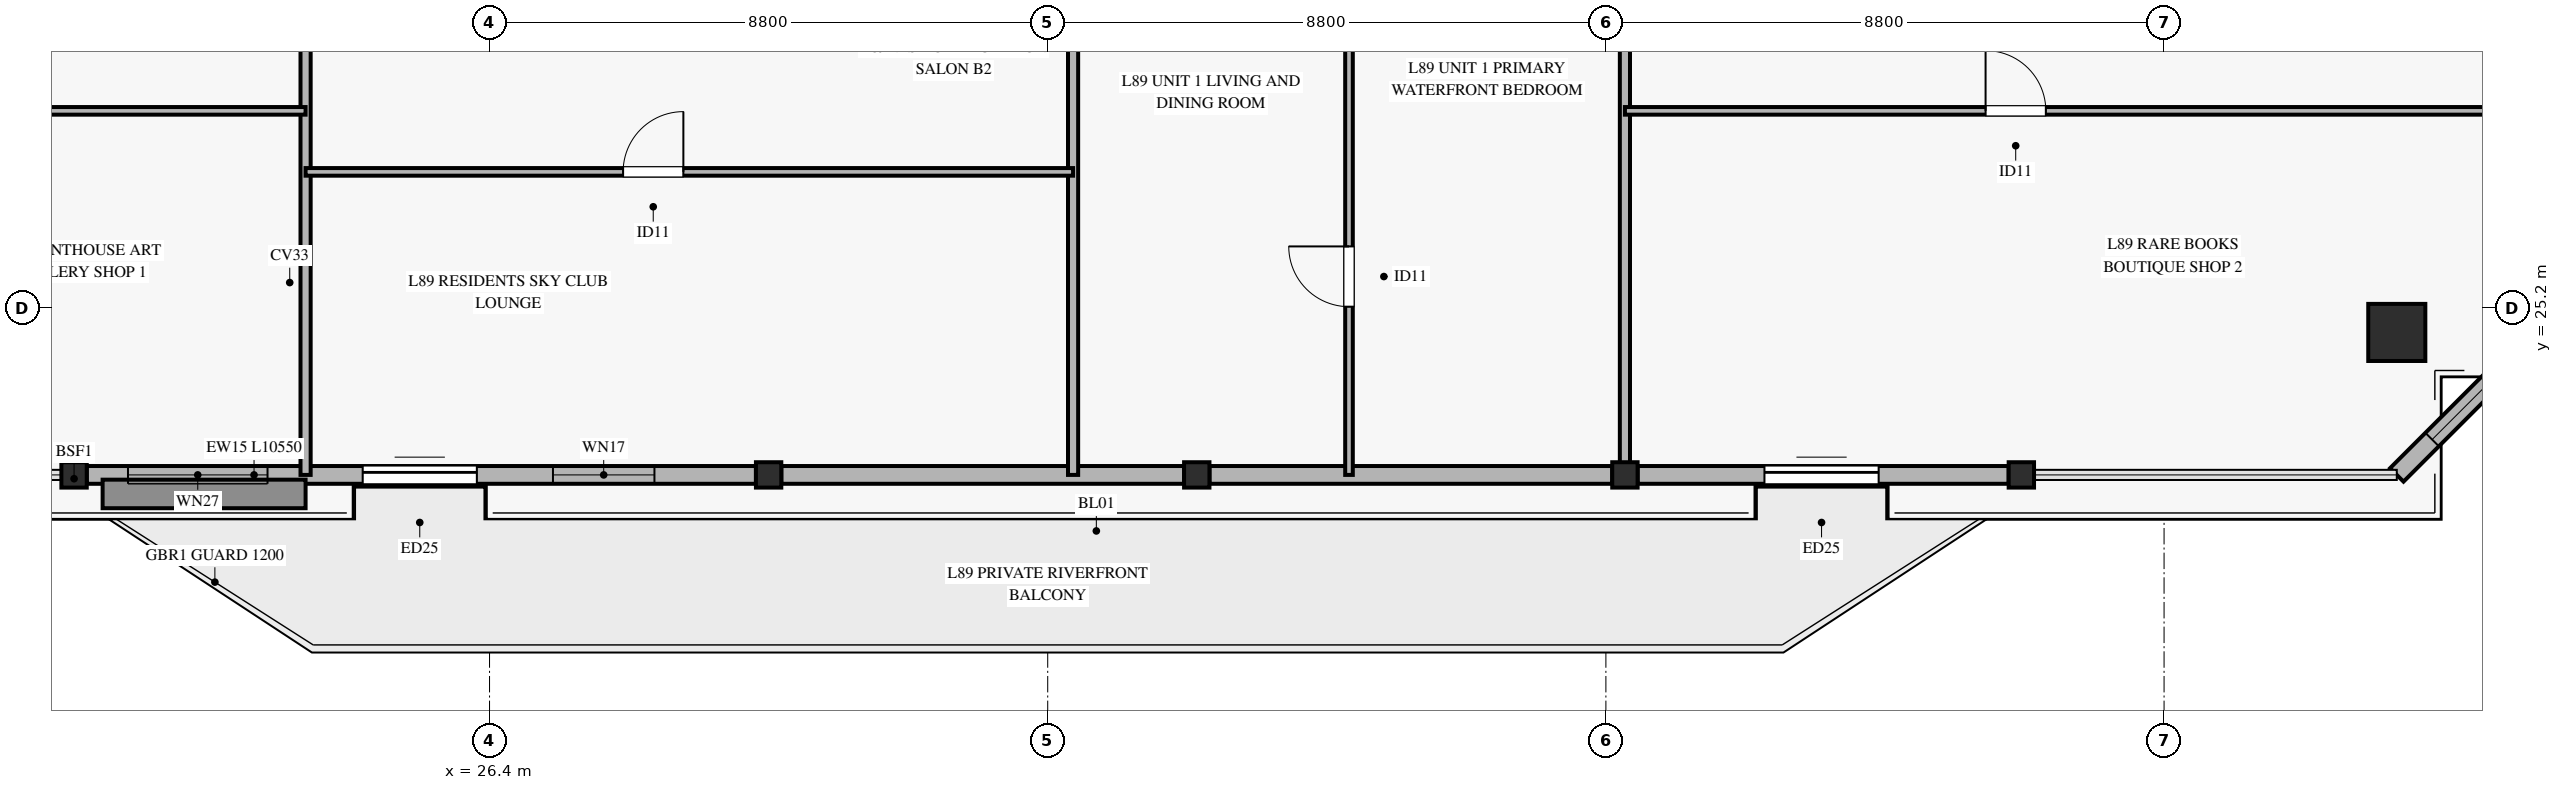
"""IFC4 building model, lengths in metres.
Left out: names, types, materials, properties, quantities, classifications, styles, units other than length and angle.
Written with IfcOpenShell. Run it as: python <this file> out.ifc"""

import sys

from ifc_helpers import new_model, si_unit, direction, frame, frame_2d, origin, origin_2d, place, context, subcontext, project, spatial, rectangle, hollow_rectangle, extrude, source, transform, mapped, element, fill, save


model = new_model("IFC4")
c1 = context("Model", 3, precision=1e-05, world=origin(), true_north=direction((0.0, 1.0)))
c2 = subcontext(c1, "Body", "Model", "MODEL_VIEW")
j1 = project(units=[si_unit("LENGTHUNIT", "METRE"), si_unit("PLANEANGLEUNIT", "RADIAN")], contexts=[c1])
p1 = place(None, origin())
s1 = spatial("IfcSite", under=j1, at=p1, CompositionType="ELEMENT")
p2 = place(p1, origin())
s2 = spatial("IfcBuilding", under=s1, at=p2, CompositionType="ELEMENT")
p3 = place(p2, frame((0.0, 0.0, 342.5)))
s3 = spatial("IfcBuildingStorey", under=s2, at=p3, CompositionType="ELEMENT", Elevation=342.5)
m1 = source(origin(), c2, "Body", "SweptSolid", [
    extrude(hollow_rectangle(XDim=0.9, YDim=0.9, WallThickness=0.04, at=origin_2d()), origin(), (0.0, 0.0, 1.0), 3.326),
])
p4 = place(p3, frame((56.469, 24.814, 0.0), z_axis=(-0.110896020197, 0.266341268892, 0.957478146586), x_axis=(-0.92317473482, -0.384380552305, 0.0)))
e1 = element("IfcColumn", 1, at=p4, inside=s3, PredefinedType="COLUMN", context=c2, shape_type="MappedRepresentation", body=[
    mapped(m1, transform((0.0, 0.0, 0.0), x_axis=(1.0, 0.0, 0.0), y_axis=(0.0, 1.0, 0.0), z_axis=(0.0, 0.0, 1.0), scale=1.0)),
])
m2 = source(origin(), c2, "Body", "SweptSolid", [
    extrude(hollow_rectangle(XDim=0.4, YDim=0.4, WallThickness=0.02, at=origin_2d()), origin(), (0.0, 0.0, 1.0), 3.319),
])
for number, where, z_axis, x_axis in (
    (2, (19.85, 22.568, 0.0), (0.0, 0.281, 0.96), (-1.0, 0.0, 0.0)),
    (3, (30.8, 22.568, 0.0), (0.0, 0.281, 0.96), (-1.0, 0.0, 0.0)),
    (4, (37.55, 22.568, 0.0), (0.0, 0.281, 0.96), (-1.0, 0.0, 0.0)),
    (5, (44.3, 22.568, 0.0), (0.0, 0.281, 0.96), (-1.0, 0.0, 0.0)),
    (6, (50.55, 22.568, 0.0), (0.0, 0.281, 0.96), (-1.0, 0.0, 0.0)),
):
    element("IfcColumn", number, at=place(p3, frame(where, z_axis=z_axis, x_axis=x_axis)), inside=s3, PredefinedType="COLUMN", context=c2, shape_type="MappedRepresentation", body=[
        mapped(m2, transform((0.0, 0.0, 0.0), x_axis=(1.0, 0.0, 0.0), y_axis=(0.0, 1.0, 0.0), z_axis=(0.0, 0.0, 1.0), scale=1.0)),
    ])
p5 = place(p3, frame((20.05, 22.568, 0.0), z_axis=(0.0, 0.0, 1.0), x_axis=(1.0, 0.0, 0.0)))
e7 = element("IfcWall", 7, at=p5, inside=s3, PredefinedType="SOLIDWALL", context=c2, shape_type="SweptSolid", body=[
    extrude(rectangle(XDim=10.55, YDim=0.28, at=frame_2d((5.275, 0.0))), origin(), (0.0, 0.0, 1.0), 2.815),
])
p6 = place(p5, frame((4.35, 0.0, 0.0)))
e8 = element("IfcOpeningElement", 8, at=p6, cuts=e7, PredefinedType="OPENING", context=c2, shape_type="SweptSolid", body=[
    extrude(rectangle(XDim=1.8, YDim=2.25, at=frame_2d((0.9, 1.125))), frame((0.0, 0.15, 0.0), z_axis=(0.0, -1.0, 0.0), x_axis=(1.0, 0.0, 0.0)), (0.0, 0.0, 1.0), 0.3),
])
p7 = place(p5, frame((0.65, 0.0, 0.45)))
e9 = element("IfcOpeningElement", 9, at=p7, cuts=e7, PredefinedType="OPENING", context=c2, shape_type="SweptSolid", body=[
    extrude(rectangle(XDim=2.2, YDim=2.1, at=frame_2d((1.1, 1.05))), frame((0.0, 0.15, 0.0), z_axis=(0.0, -1.0, 0.0), x_axis=(1.0, 0.0, 0.0)), (0.0, 0.0, 1.0), 0.3),
])
p8 = place(p5, frame((7.35, 0.0, 0.45)))
e10 = element("IfcOpeningElement", 10, at=p8, cuts=e7, PredefinedType="OPENING", context=c2, shape_type="SweptSolid", body=[
    extrude(rectangle(XDim=1.6, YDim=2.0, at=frame_2d((0.8, 1.0))), frame((0.0, 0.15, 0.0), z_axis=(0.0, -1.0, 0.0), x_axis=(1.0, 0.0, 0.0)), (0.0, 0.0, 1.0), 0.3),
])
for number, where, z_axis, x_axis in (
    (11, (31.0, 22.568, 0.0), (0.0, 0.0, 1.0), (1.0, 0.0, 0.0)),
    (12, (37.75, 22.568, 0.0), (0.0, 0.0, 1.0), (1.0, 0.0, 0.0)),
):
    element("IfcWall", number, at=place(p3, frame(where, z_axis=z_axis, x_axis=x_axis)), inside=s3, PredefinedType="SOLIDWALL", context=c2, shape_type="SweptSolid", body=[
        extrude(rectangle(XDim=6.35, YDim=0.28, at=frame_2d((3.175, 0.0))), origin(), (0.0, 0.0, 1.0), 2.815),
    ])
p9 = place(p3, frame((44.5, 22.568, 0.0), z_axis=(0.0, 0.0, 1.0), x_axis=(1.0, 0.0, 0.0)))
e13 = element("IfcWall", 13, at=p9, inside=s3, PredefinedType="SOLIDWALL", context=c2, shape_type="SweptSolid", body=[
    extrude(rectangle(XDim=5.85, YDim=0.28, at=frame_2d((2.925, 0.0))), origin(), (0.0, 0.0, 1.0), 2.815),
])
p10 = place(p9, frame((2.0, 0.0, 0.0)))
e14 = element("IfcOpeningElement", 14, at=p10, cuts=e13, PredefinedType="OPENING", context=c2, shape_type="SweptSolid", body=[
    extrude(rectangle(XDim=1.8, YDim=2.25, at=frame_2d((0.9, 1.125))), frame((0.0, 0.15, 0.0), z_axis=(0.0, -1.0, 0.0), x_axis=(1.0, 0.0, 0.0)), (0.0, 0.0, 1.0), 0.3),
])
p11 = place(p3, frame((56.469, 22.568, 0.0), z_axis=(0.0, 0.0, 1.0), x_axis=(0.707145211947, 0.707068348337, 0.0)))
e15 = element("IfcWall", 15, at=p11, inside=s3, PredefinedType="SOLIDWALL", context=c2, shape_type="SweptSolid", body=[
    extrude(rectangle(XDim=3.176, YDim=0.3, at=frame_2d((1.588, 0.0))), origin(), (0.0, 0.0, 1.0), 2.815),
])
p12 = place(p11, frame((0.788, 0.0, 0.45)))
e16 = element("IfcOpeningElement", 16, at=p12, cuts=e15, PredefinedType="OPENING", context=c2, shape_type="SweptSolid", body=[
    extrude(rectangle(XDim=1.6, YDim=2.0, at=frame_2d((0.8, 1.0))), frame((0.0, 0.16, 0.0), z_axis=(0.0, -1.0, 0.0), x_axis=(1.0, 0.0, 0.0)), (0.0, 0.0, 1.0), 0.32),
])
p13 = place(p3, frame((23.5, 22.568, 0.0), z_axis=(0.0, 0.0, 1.0), x_axis=(0.0, 1.0, 0.0)))
e17 = element("IfcWall", 17, at=p13, inside=s3, PredefinedType="PARTITIONING", context=c2, shape_type="SweptSolid", body=[
    extrude(rectangle(XDim=14.882, YDim=0.16, at=frame_2d((7.441, 0.0))), origin(), (0.0, 0.0, 1.0), 2.77),
])
p14 = place(p13, frame((12.352, 0.0, 0.0)))
e18 = element("IfcOpeningElement", 18, at=p14, cuts=e17, PredefinedType="OPENING", context=c2, shape_type="SweptSolid", body=[
    extrude(rectangle(XDim=1.05, YDim=2.15, at=frame_2d((0.525, 1.075))), frame((0.0, 0.09, 0.0), z_axis=(0.0, -1.0, 0.0), x_axis=(1.0, 0.0, 0.0)), (0.0, 0.0, 1.0), 0.18),
])
p15 = place(p3, frame((35.6, 22.568, 0.0), z_axis=(0.0, 0.0, 1.0), x_axis=(0.0, 1.0, 0.0)))
e19 = element("IfcWall", 19, at=p15, inside=s3, PredefinedType="PARTITIONING", context=c2, shape_type="SweptSolid", body=[
    extrude(rectangle(XDim=11.932, YDim=0.16, at=frame_2d((5.966, 0.0))), origin(), (0.0, 0.0, 1.0), 2.77),
])
p16 = place(p3, frame((44.3, 22.568, 0.0), z_axis=(0.0, 0.0, 1.0), x_axis=(0.0, 1.0, 0.0)))
e20 = element("IfcWall", 20, at=p16, inside=s3, PredefinedType="PARTITIONING", context=c2, shape_type="SweptSolid", body=[
    extrude(rectangle(XDim=14.882, YDim=0.16, at=frame_2d((7.441, 0.0))), origin(), (0.0, 0.0, 1.0), 2.47),
])
p17 = place(p16, frame((12.352, 0.0, 0.0)))
e21 = element("IfcOpeningElement", 21, at=p17, cuts=e20, PredefinedType="OPENING", context=c2, shape_type="SweptSolid", body=[
    extrude(rectangle(XDim=1.05, YDim=2.15, at=frame_2d((0.525, 1.075))), frame((0.0, 0.09, 0.0), z_axis=(0.0, -1.0, 0.0), x_axis=(1.0, 0.0, 0.0)), (0.0, 0.0, 1.0), 0.18),
])
p18 = place(p3, frame((11.685, 28.307, 0.0), z_axis=(0.0, 0.0, 1.0), x_axis=(1.0, 0.0, 0.0)))
e22 = element("IfcWall", 22, at=p18, inside=s3, PredefinedType="PARTITIONING", context=c2, shape_type="SweptSolid", body=[
    extrude(rectangle(XDim=11.815, YDim=0.12, at=frame_2d((5.907, 0.0))), origin(), (0.0, 0.0, 1.0), 2.47),
])
p19 = place(p18, frame((5.261, 0.0, 0.0)))
e23 = element("IfcOpeningElement", 23, at=p19, cuts=e22, PredefinedType="OPENING", context=c2, shape_type="SweptSolid", body=[
    extrude(rectangle(XDim=0.95, YDim=2.1, at=frame_2d((0.475, 1.05))), frame((0.0, 0.07, 0.0), z_axis=(0.0, -1.0, 0.0), x_axis=(1.0, 0.0, 0.0)), (0.0, 0.0, 1.0), 0.14),
])
p20 = place(p3, frame((23.5, 27.345, 0.0), z_axis=(0.0, 0.0, 1.0), x_axis=(1.0, 0.0, 0.0)))
e24 = element("IfcWall", 24, at=p20, inside=s3, PredefinedType="PARTITIONING", context=c2, shape_type="SweptSolid", body=[
    extrude(rectangle(XDim=12.1, YDim=0.12, at=frame_2d((6.05, 0.0))), origin(), (0.0, 0.0, 1.0), 2.47),
])
p21 = place(p20, frame((5.006, 0.0, 0.0)))
e25 = element("IfcOpeningElement", 25, at=p21, cuts=e24, PredefinedType="OPENING", context=c2, shape_type="SweptSolid", body=[
    extrude(rectangle(XDim=0.95, YDim=2.1, at=frame_2d((0.475, 1.05))), frame((0.0, 0.07, 0.0), z_axis=(0.0, -1.0, 0.0), x_axis=(1.0, 0.0, 0.0)), (0.0, 0.0, 1.0), 0.14),
])
p22 = place(p3, frame((39.95, 22.568, 0.0), z_axis=(0.0, 0.0, 1.0), x_axis=(0.0, 1.0, 0.0)))
e26 = element("IfcWall", 26, at=p22, inside=s3, PredefinedType="PARTITIONING", context=c2, shape_type="SweptSolid", body=[
    extrude(rectangle(XDim=9.282, YDim=0.12, at=frame_2d((4.641, 0.0))), origin(), (0.0, 0.0, 1.0), 2.77),
])
p23 = place(p22, frame((2.652, 0.0, 0.0)))
e27 = element("IfcOpeningElement", 27, at=p23, cuts=e26, PredefinedType="OPENING", context=c2, shape_type="SweptSolid", body=[
    extrude(rectangle(XDim=0.95, YDim=2.1, at=frame_2d((0.475, 1.05))), frame((0.0, 0.07, 0.0), z_axis=(0.0, -1.0, 0.0), x_axis=(1.0, 0.0, 0.0)), (0.0, 0.0, 1.0), 0.14),
])
p24 = place(p3, frame((44.3, 28.307, 0.0), z_axis=(0.0, 0.0, 1.0), x_axis=(1.0, 0.0, 0.0)))
e28 = element("IfcWall", 28, at=p24, inside=s3, PredefinedType="PARTITIONING", context=c2, shape_type="SweptSolid", body=[
    extrude(rectangle(XDim=14.415, YDim=0.12, at=frame_2d((7.208, 0.0))), origin(), (0.0, 0.0, 1.0), 2.47),
])
p25 = place(p24, frame((5.686, 0.0, 0.0)))
e29 = element("IfcOpeningElement", 29, at=p25, cuts=e28, PredefinedType="OPENING", context=c2, shape_type="SweptSolid", body=[
    extrude(rectangle(XDim=0.95, YDim=2.1, at=frame_2d((0.475, 1.05))), frame((0.0, 0.07, 0.0), z_axis=(0.0, -1.0, 0.0), x_axis=(1.0, 0.0, 0.0)), (0.0, 0.0, 1.0), 0.14),
])
m3 = source(origin(), c2, "Body", "SweptSolid", [
    extrude(rectangle(XDim=1.8, YDim=2.25, at=frame_2d((0.9, 1.125))), frame((0.0, 0.025, 0.0), z_axis=(0.0, -1.0, 0.0), x_axis=(1.0, 0.0, 0.0)), (0.0, 0.0, 1.0), 0.05),
])
p26 = place(p6, origin())
e30 = element("IfcDoor", 30, at=p26, inside=s3, OperationType="SLIDING_TO_LEFT", PredefinedType="DOOR", context=c2, shape_type="MappedRepresentation", body=[
    mapped(m3, transform((0.0, 0.0, 0.0), x_axis=(1.0, 0.0, 0.0), y_axis=(0.0, 1.0, 0.0), z_axis=(0.0, 0.0, 1.0), scale=1.0)),
])
fill(e8, e30)
m4 = source(origin(), c2, "Body", "SweptSolid", [
    extrude(rectangle(XDim=2.2, YDim=2.1, at=frame_2d((1.1, 1.05))), frame((0.0, 0.03, 0.0), z_axis=(0.0, -1.0, 0.0), x_axis=(1.0, 0.0, 0.0)), (0.0, 0.0, 1.0), 0.06),
])
p27 = place(p7, origin())
e31 = element("IfcWindow", 31, at=p27, inside=s3, PartitioningType="SINGLE_PANEL", PredefinedType="WINDOW", context=c2, shape_type="MappedRepresentation", body=[
    mapped(m4, transform((0.0, 0.0, 0.0), x_axis=(1.0, 0.0, 0.0), y_axis=(0.0, 1.0, 0.0), z_axis=(0.0, 0.0, 1.0), scale=1.0)),
])
fill(e9, e31)
m5 = source(origin(), c2, "Body", "SweptSolid", [
    extrude(rectangle(XDim=1.6, YDim=2.0, at=frame_2d((0.8, 1.0))), frame((0.0, 0.03, 0.0), z_axis=(0.0, -1.0, 0.0), x_axis=(1.0, 0.0, 0.0)), (0.0, 0.0, 1.0), 0.06),
])
p28 = place(p8, origin())
e32 = element("IfcWindow", 32, at=p28, inside=s3, PartitioningType="SINGLE_PANEL", PredefinedType="WINDOW", context=c2, shape_type="MappedRepresentation", body=[
    mapped(m5, transform((0.0, 0.0, 0.0), x_axis=(1.0, 0.0, 0.0), y_axis=(0.0, 1.0, 0.0), z_axis=(0.0, 0.0, 1.0), scale=1.0)),
])
fill(e10, e32)
p29 = place(p10, origin())
e33 = element("IfcDoor", 33, at=p29, inside=s3, OperationType="SLIDING_TO_LEFT", PredefinedType="DOOR", context=c2, shape_type="MappedRepresentation", body=[
    mapped(m3, transform((0.0, 0.0, 0.0), x_axis=(1.0, 0.0, 0.0), y_axis=(0.0, 1.0, 0.0), z_axis=(0.0, 0.0, 1.0), scale=1.0)),
])
fill(e14, e33)
p30 = place(p12, origin())
e34 = element("IfcWindow", 34, at=p30, inside=s3, PartitioningType="SINGLE_PANEL", PredefinedType="WINDOW", context=c2, shape_type="MappedRepresentation", body=[
    mapped(m5, transform((0.0, 0.0, 0.0), x_axis=(1.0, 0.0, 0.0), y_axis=(0.0, 1.0, 0.0), z_axis=(0.0, 0.0, 1.0), scale=1.0)),
])
fill(e16, e34)
m6 = source(origin(), c2, "Body", "SweptSolid", [
    extrude(rectangle(XDim=0.95, YDim=2.1, at=frame_2d((0.475, 1.05))), frame((0.0, 0.025, 0.0), z_axis=(0.0, -1.0, 0.0), x_axis=(1.0, 0.0, 0.0)), (0.0, 0.0, 1.0), 0.05),
])
p31 = place(p21, origin())
e35 = element("IfcDoor", 35, at=p31, inside=s3, OperationType="SINGLE_SWING_RIGHT", PredefinedType="DOOR", context=c2, shape_type="MappedRepresentation", body=[
    mapped(m6, transform((0.0, 0.0, 0.0), x_axis=(1.0, 0.0, 0.0), y_axis=(0.0, 1.0, 0.0), z_axis=(0.0, 0.0, 1.0), scale=1.0)),
])
fill(e25, e35)
p32 = place(p23, origin())
e36 = element("IfcDoor", 36, at=p32, inside=s3, OperationType="SINGLE_SWING_RIGHT", PredefinedType="DOOR", context=c2, shape_type="MappedRepresentation", body=[
    mapped(m6, transform((0.0, 0.0, 0.0), x_axis=(1.0, 0.0, 0.0), y_axis=(0.0, 1.0, 0.0), z_axis=(0.0, 0.0, 1.0), scale=1.0)),
])
fill(e27, e36)
p33 = place(p25, origin())
e37 = element("IfcDoor", 37, at=p33, inside=s3, OperationType="SINGLE_SWING_LEFT", PredefinedType="DOOR", context=c2, shape_type="MappedRepresentation", body=[
    mapped(m6, transform((0.0, 0.0, 0.0), x_axis=(1.0, 0.0, 0.0), y_axis=(0.0, 1.0, 0.0), z_axis=(0.0, 0.0, 1.0), scale=1.0)),
])
fill(e29, e37)
save(model, sys.argv[1])
